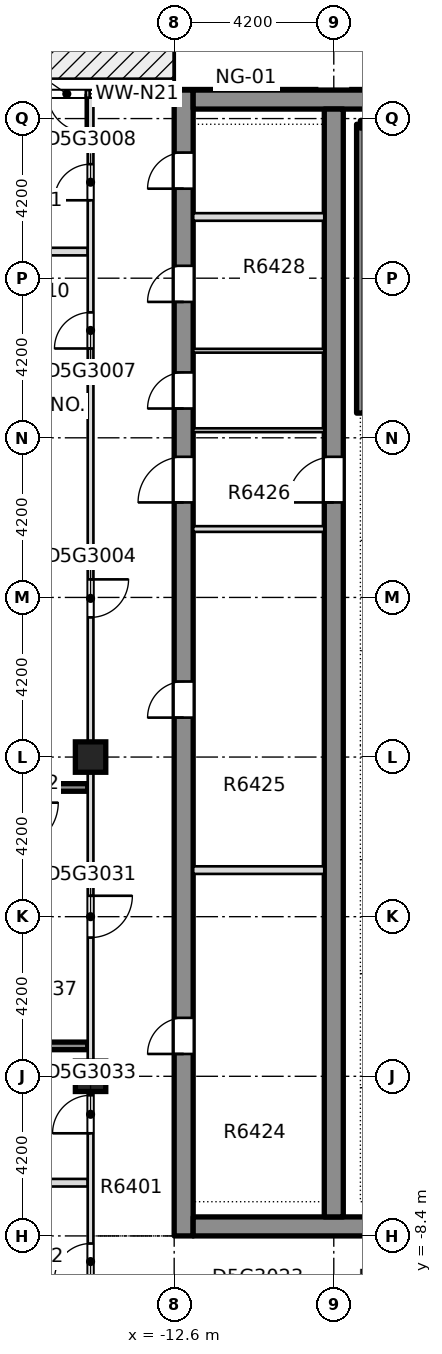
"""IFC4 building model, lengths in metres.
Left out: names, types, materials, properties, quantities, classifications, styles, units other than length and angle.
Written with IfcOpenShell. Run it as: python <this file> out.ifc"""

import sys

from ifc_helpers import new_model, si_unit, direction, frame, frame_2d, origin, origin_2d, place, context, subcontext, project, spatial, rectangle, extrude, element, fill, save


model = new_model("IFC4")
c1 = context("Model", 3, precision=1e-05, world=origin(), true_north=direction((0.0, 1.0)))
c2 = subcontext(c1, "Body", "Model", "MODEL_VIEW")
j1 = project(units=[si_unit("LENGTHUNIT", "METRE"), si_unit("PLANEANGLEUNIT", "RADIAN")], contexts=[c1])
p1 = place(None, origin())
s1 = spatial("IfcSite", under=j1, at=p1, CompositionType="ELEMENT")
p2 = place(p1, origin())
s2 = spatial("IfcBuilding", under=s1, at=p2, CompositionType="ELEMENT")
p3 = place(p2, frame((0.0, 0.0, 244.15)))
s3 = spatial("IfcBuildingStorey", under=s2, at=p3, CompositionType="ELEMENT", Elevation=244.15)
p4 = place(p3, frame((-12.35, -8.4, -0.4), z_axis=(0.0, 0.0, 1.0), x_axis=(0.0, 1.0, 0.0)))
e1 = element("IfcWall", 1, at=p4, inside=s3, PredefinedType="SHEAR", context=c2, shape_type="SweptSolid", body=[
    extrude(rectangle(XDim=30.15, YDim=0.5, at=frame_2d((15.075, 0.0))), origin(), (0.0, 0.0, 1.0), 3.45),
])
p5 = place(p4, frame((4.788, 0.0, 0.4)))
e2 = element("IfcOpeningElement", 2, at=p5, cuts=e1, PredefinedType="OPENING", context=c2, shape_type="SweptSolid", body=[
    extrude(rectangle(XDim=0.95, YDim=2.1, at=frame_2d((0.475, 1.05))), frame((0.0, 0.26, 0.0), z_axis=(0.0, -1.0, 0.0), x_axis=(1.0, 0.0, 0.0)), (0.0, 0.0, 1.0), 0.52),
])
p6 = place(p4, frame((13.638, 0.0, 0.4)))
e3 = element("IfcOpeningElement", 3, at=p6, cuts=e1, PredefinedType="OPENING", context=c2, shape_type="SweptSolid", body=[
    extrude(rectangle(XDim=0.95, YDim=2.1, at=frame_2d((0.475, 1.05))), frame((0.0, 0.26, 0.0), z_axis=(0.0, -1.0, 0.0), x_axis=(1.0, 0.0, 0.0)), (0.0, 0.0, 1.0), 0.52),
])
p7 = place(p4, frame((21.771, 0.0, 0.4)))
e4 = element("IfcOpeningElement", 4, at=p7, cuts=e1, PredefinedType="OPENING", context=c2, shape_type="SweptSolid", body=[
    extrude(rectangle(XDim=0.95, YDim=2.1, at=frame_2d((0.475, 1.05))), frame((0.0, 0.26, 0.0), z_axis=(0.0, -1.0, 0.0), x_axis=(1.0, 0.0, 0.0)), (0.0, 0.0, 1.0), 0.52),
])
p8 = place(p4, frame((24.576, 0.0, 0.4)))
e5 = element("IfcOpeningElement", 5, at=p8, cuts=e1, PredefinedType="OPENING", context=c2, shape_type="SweptSolid", body=[
    extrude(rectangle(XDim=0.95, YDim=2.1, at=frame_2d((0.475, 1.05))), frame((0.0, 0.26, 0.0), z_axis=(0.0, -1.0, 0.0), x_axis=(1.0, 0.0, 0.0)), (0.0, 0.0, 1.0), 0.52),
])
p9 = place(p4, frame((27.555, 0.0, 0.4)))
e6 = element("IfcOpeningElement", 6, at=p9, cuts=e1, PredefinedType="OPENING", context=c2, shape_type="SweptSolid", body=[
    extrude(rectangle(XDim=0.95, YDim=2.1, at=frame_2d((0.475, 1.05))), frame((0.0, 0.26, 0.0), z_axis=(0.0, -1.0, 0.0), x_axis=(1.0, 0.0, 0.0)), (0.0, 0.0, 1.0), 0.52),
])
p10 = place(p4, frame((19.3, 0.0, 0.4)))
e7 = element("IfcOpeningElement", 7, at=p10, cuts=e1, PredefinedType="OPENING", context=c2, shape_type="SweptSolid", body=[
    extrude(rectangle(XDim=1.2, YDim=2.1, at=frame_2d((0.6, 1.05))), frame((0.0, 0.26, 0.0), z_axis=(0.0, -1.0, 0.0), x_axis=(1.0, 0.0, 0.0)), (0.0, 0.0, 1.0), 0.52),
])
p11 = place(p3, frame((-12.1, -8.15, -0.4), z_axis=(0.0, 0.0, 1.0), x_axis=(1.0, 0.0, 0.0)))
e8 = element("IfcWall", 8, at=p11, inside=s3, PredefinedType="SHEAR", context=c2, shape_type="SweptSolid", body=[
    extrude(rectangle(XDim=24.2, YDim=0.5, at=frame_2d((12.1, 0.0))), origin(), (0.0, 0.0, 1.0), 3.45),
])
p12 = place(p11, frame((7.35, 0.0, 0.4)))
e9 = element("IfcOpeningElement", 9, at=p12, cuts=e8, PredefinedType="OPENING", context=c2, shape_type="SweptSolid", body=[
    extrude(rectangle(XDim=1.8, YDim=2.1, at=frame_2d((0.9, 1.05))), frame((0.0, 0.26, 0.0), z_axis=(0.0, -1.0, 0.0), x_axis=(1.0, 0.0, 0.0)), (0.0, 0.0, 1.0), 0.52),
])
p13 = place(p11, frame((15.05, 0.0, 0.4)))
e10 = element("IfcOpeningElement", 10, at=p13, cuts=e8, PredefinedType="OPENING", context=c2, shape_type="SweptSolid", body=[
    extrude(rectangle(XDim=1.8, YDim=2.1, at=frame_2d((0.9, 1.05))), frame((0.0, 0.26, 0.0), z_axis=(0.0, -1.0, 0.0), x_axis=(1.0, 0.0, 0.0)), (0.0, 0.0, 1.0), 0.52),
])
p14 = place(p3, frame((-12.1, 21.5, -0.4), z_axis=(0.0, 0.0, 1.0), x_axis=(1.0, 0.0, 0.0)))
e11 = element("IfcWall", 11, at=p14, inside=s3, PredefinedType="SHEAR", context=c2, shape_type="SweptSolid", body=[
    extrude(rectangle(XDim=24.2, YDim=0.5, at=frame_2d((12.1, 0.0))), origin(), (0.0, 0.0, 1.0), 3.45),
])
p15 = place(p3, frame((-8.4, -7.9, -0.4), z_axis=(0.0, 0.0, 1.0), x_axis=(0.0, 1.0, 0.0)))
e12 = element("IfcWall", 12, at=p15, inside=s3, PredefinedType="SHEAR", context=c2, shape_type="SweptSolid", body=[
    extrude(rectangle(XDim=29.15, YDim=0.5, at=frame_2d((14.575, 0.0))), origin(), (0.0, 0.0, 1.0), 3.45),
])
p16 = place(p15, frame((18.8, 0.0, 0.4)))
e13 = element("IfcOpeningElement", 13, at=p16, cuts=e12, PredefinedType="OPENING", context=c2, shape_type="SweptSolid", body=[
    extrude(rectangle(XDim=1.2, YDim=2.1, at=frame_2d((0.6, 1.05))), frame((0.0, 0.26, 0.0), z_axis=(0.0, -1.0, 0.0), x_axis=(1.0, 0.0, 0.0)), (0.0, 0.0, 1.0), 0.52),
])
for number, where, z_axis, x_axis in (
    (14, (-14.8, -4.2, -0.4), (0.0, 0.0, 1.0), (1.0, 0.0, 0.0)),
    (15, (-14.8, 4.2, -0.4), (0.0, 0.0, 1.0), (1.0, 0.0, 0.0)),
):
    element("IfcColumn", number, at=place(p3, frame(where, z_axis=z_axis, x_axis=x_axis)), inside=s3, PredefinedType="COLUMN", context=c2, shape_type="SweptSolid", body=[
        extrude(rectangle(XDim=0.8, YDim=0.8, at=origin_2d()), origin(), (0.0, 0.0, 1.0), 3.45),
    ])
p17 = place(p3, frame((-25.75, -7.0, 0.0), z_axis=(0.0, 0.0, 1.0), x_axis=(1.0, 0.0, 0.0)))
e16 = element("IfcWall", 16, at=p17, inside=s3, PredefinedType="PARTITIONING", context=c2, shape_type="SweptSolid", body=[
    extrude(rectangle(XDim=10.875, YDim=0.2, at=frame_2d((5.438, 0.0))), origin(), (0.0, 0.0, 1.0), 3.05),
])
p18 = place(p3, frame((-20.4, -3.4, 0.0), z_axis=(0.0, 0.0, 1.0), x_axis=(1.0, 0.0, 0.0)))
e17 = element("IfcWall", 17, at=p18, inside=s3, PredefinedType="SOLIDWALL", context=c2, shape_type="SweptSolid", body=[
    extrude(rectangle(XDim=5.525, YDim=0.2, at=frame_2d((2.762, 0.0))), origin(), (0.0, 0.0, 1.0), 3.05),
])
p19 = place(p3, frame((-20.45, 3.4, 0.0), z_axis=(0.0, 0.0, 1.0), x_axis=(1.0, 0.0, 0.0)))
e18 = element("IfcWall", 18, at=p19, inside=s3, PredefinedType="SOLIDWALL", context=c2, shape_type="SweptSolid", body=[
    extrude(rectangle(XDim=5.575, YDim=0.2, at=frame_2d((2.788, 0.0))), origin(), (0.0, 0.0, 1.0), 3.05),
])
for number, where, z_axis, x_axis in (
    (19, (-17.35, 13.35, 0.0), (0.0, 0.0, 1.0), (1.0, 0.0, 0.0)),
    (20, (-17.35, 17.5, 0.0), (0.0, 0.0, 1.0), (1.0, 0.0, 0.0)),
):
    element("IfcWall", number, at=place(p3, frame(where, z_axis=z_axis, x_axis=x_axis)), inside=s3, PredefinedType="PARTITIONING", context=c2, shape_type="SweptSolid", body=[
        extrude(rectangle(XDim=2.475, YDim=0.2, at=frame_2d((1.238, 0.0))), origin(), (0.0, 0.0, 1.0), 3.05),
    ])
p20 = place(p3, frame((-14.8, -9.85, 0.0), z_axis=(0.0, 0.0, 1.0), x_axis=(0.0, 1.0, 0.0)))
e21 = element("IfcWall", 21, at=p20, inside=s3, PredefinedType="PARTITIONING", context=c2, shape_type="SweptSolid", body=[
    extrude(rectangle(XDim=31.4, YDim=0.15, at=frame_2d((15.7, 0.0))), origin(), (0.0, 0.0, 1.0), 3.05),
])
p21 = place(p20, frame((0.3, 0.0, 0.0)))
e22 = element("IfcOpeningElement", 22, at=p21, cuts=e21, PredefinedType="OPENING", context=c2, shape_type="SweptSolid", body=[
    extrude(rectangle(XDim=0.95, YDim=2.1, at=frame_2d((0.475, 1.05))), frame((0.0, 0.085, 0.0), z_axis=(0.0, -1.0, 0.0), x_axis=(1.0, 0.0, 0.0)), (0.0, 0.0, 1.0), 0.17),
])
p22 = place(p20, frame((17.725, 0.0, 0.0)))
e23 = element("IfcOpeningElement", 23, at=p22, cuts=e21, PredefinedType="OPENING", context=c2, shape_type="SweptSolid", body=[
    extrude(rectangle(XDim=1.0, YDim=2.1, at=frame_2d((0.5, 1.05))), frame((0.0, 0.085, 0.0), z_axis=(0.0, -1.0, 0.0), x_axis=(1.0, 0.0, 0.0)), (0.0, 0.0, 1.0), 0.17),
])
p23 = place(p20, frame((24.8, 0.0, 0.0)))
e24 = element("IfcOpeningElement", 24, at=p23, cuts=e21, PredefinedType="OPENING", context=c2, shape_type="SweptSolid", body=[
    extrude(rectangle(XDim=0.95, YDim=2.1, at=frame_2d((0.475, 1.05))), frame((0.0, 0.085, 0.0), z_axis=(0.0, -1.0, 0.0), x_axis=(1.0, 0.0, 0.0)), (0.0, 0.0, 1.0), 0.17),
])
p24 = place(p20, frame((28.7, 0.0, 0.0)))
e25 = element("IfcOpeningElement", 25, at=p24, cuts=e21, PredefinedType="OPENING", context=c2, shape_type="SweptSolid", body=[
    extrude(rectangle(XDim=0.95, YDim=2.1, at=frame_2d((0.475, 1.05))), frame((0.0, 0.085, 0.0), z_axis=(0.0, -1.0, 0.0), x_axis=(1.0, 0.0, 0.0)), (0.0, 0.0, 1.0), 0.17),
])
p25 = place(p20, frame((9.3, 0.0, 0.0)))
e26 = element("IfcOpeningElement", 26, at=p25, cuts=e21, PredefinedType="OPENING", context=c2, shape_type="SweptSolid", body=[
    extrude(rectangle(XDim=1.1, YDim=2.1, at=frame_2d((0.55, 1.05))), frame((0.0, 0.085, 0.0), z_axis=(0.0, -1.0, 0.0), x_axis=(1.0, 0.0, 0.0)), (0.0, 0.0, 1.0), 0.17),
])
p26 = place(p20, frame((4.15, 0.0, 0.0)))
e27 = element("IfcOpeningElement", 27, at=p26, cuts=e21, PredefinedType="OPENING", context=c2, shape_type="SweptSolid", body=[
    extrude(rectangle(XDim=1.0, YDim=2.1, at=frame_2d((0.5, 1.05))), frame((0.0, 0.085, 0.0), z_axis=(0.0, -1.0, 0.0), x_axis=(1.0, 0.0, 0.0)), (0.0, 0.0, 1.0), 0.17),
])
p27 = place(p3, frame((-12.6, 21.65, 0.0), z_axis=(0.0, 0.0, 1.0), x_axis=(-1.0, 0.0, 0.0)))
e28 = element("IfcWall", 28, at=p27, inside=s3, PredefinedType="STANDARD", context=c2, shape_type="SweptSolid", body=[
    extrude(rectangle(XDim=3.75, YDim=0.2, at=frame_2d((1.875, 0.0))), origin(), (0.0, 0.0, 1.0), 3.05),
])
p28 = place(p27, frame((0.425, 0.0, 0.2)))
e29 = element("IfcOpeningElement", 29, at=p28, cuts=e28, PredefinedType="OPENING", context=c2, shape_type="SweptSolid", body=[
    extrude(rectangle(XDim=1.8, YDim=2.65, at=frame_2d((0.9, 1.325))), frame((0.0, 0.11, 0.0), z_axis=(0.0, -1.0, 0.0), x_axis=(1.0, 0.0, 0.0)), (0.0, 0.0, 1.0), 0.22),
])
p29 = place(p27, frame((2.325, 0.0, 0.0)))
e30 = element("IfcOpeningElement", 30, at=p29, cuts=e28, PredefinedType="OPENING", context=c2, shape_type="SweptSolid", body=[
    extrude(rectangle(XDim=1.0, YDim=2.4, at=frame_2d((0.5, 1.2))), frame((0.0, 0.11, 0.0), z_axis=(0.0, -1.0, 0.0), x_axis=(1.0, 0.0, 0.0)), (0.0, 0.0, 1.0), 0.22),
])
p30 = place(p3, frame((-12.099, 1.225, 0.0), z_axis=(0.0, 0.0, 1.0), x_axis=(1.0, 0.0, 0.0)))
e31 = element("IfcWall", 31, at=p30, inside=s3, PredefinedType="PARTITIONING", context=c2, shape_type="SweptSolid", body=[
    extrude(rectangle(XDim=3.448, YDim=0.2, at=frame_2d((1.724, 0.0))), origin(), (0.0, 0.0, 1.0), 3.05),
])
p31 = place(p3, frame((-12.099, 10.2, 0.0), z_axis=(0.0, 0.0, 1.0), x_axis=(1.0, 0.0, 0.0)))
e32 = element("IfcWall", 32, at=p31, inside=s3, PredefinedType="PARTITIONING", context=c2, shape_type="SweptSolid", body=[
    extrude(rectangle(XDim=3.448, YDim=0.15, at=frame_2d((1.724, 0.0))), origin(), (0.0, 0.0, 1.0), 3.05),
])
for number, where, z_axis, x_axis in (
    (33, (-12.099, 12.8, 0.0), (0.0, 0.0, 1.0), (1.0, 0.0, 0.0)),
    (34, (-12.099, 14.891, 0.0), (0.0, 0.0, 1.0), (1.0, 0.0, 0.0)),
):
    element("IfcWall", number, at=place(p3, frame(where, z_axis=z_axis, x_axis=x_axis)), inside=s3, PredefinedType="PARTITIONING", context=c2, shape_type="SweptSolid", body=[
        extrude(rectangle(XDim=3.448, YDim=0.1, at=frame_2d((1.724, 0.0))), origin(), (0.0, 0.0, 1.0), 3.05),
    ])
p32 = place(p3, frame((-12.099, 18.411, 0.0), z_axis=(0.0, 0.0, 1.0), x_axis=(1.0, 0.0, 0.0)))
e35 = element("IfcWall", 35, at=p32, inside=s3, PredefinedType="PARTITIONING", context=c2, shape_type="SweptSolid", body=[
    extrude(rectangle(XDim=3.448, YDim=0.2, at=frame_2d((1.724, 0.0))), origin(), (0.0, 0.0, 1.0), 3.05),
])
p33 = place(p3, frame((-7.7, 13.25, 0.0), z_axis=(0.0, 0.0, 1.0), x_axis=(0.0, 1.0, 0.0)))
e36 = element("IfcWall", 36, at=p33, inside=s3, PredefinedType="SOLIDWALL", context=c2, shape_type="SweptSolid", body=[
    extrude(rectangle(XDim=7.6, YDim=0.2, at=frame_2d((3.8, 0.0))), origin(), (0.0, 0.0, 1.0), 3.05),
])
p34 = place(p3, frame((-7.7, 20.85, 0.0), z_axis=(0.0, 0.0, 1.0), x_axis=(1.0, 0.0, 0.0)))
e37 = element("IfcWall", 37, at=p34, inside=s3, PredefinedType="SOLIDWALL", context=c2, shape_type="SweptSolid", body=[
    extrude(rectangle(XDim=3.55, YDim=0.2, at=frame_2d((1.775, 0.0))), origin(), (0.0, 0.0, 1.0), 3.05),
])
p35 = place(p21, origin())
e38 = element("IfcDoor", 38, at=p35, inside=s3, OperationType="SINGLE_SWING_LEFT", PredefinedType="DOOR", context=c2, shape_type="SweptSolid", body=[
    extrude(rectangle(XDim=0.95, YDim=2.1, at=frame_2d((0.475, 1.05))), frame((0.0, 0.025, 0.0), z_axis=(0.0, -1.0, 0.0), x_axis=(1.0, 0.0, 0.0)), (0.0, 0.0, 1.0), 0.05),
])
fill(e22, e38)
p36 = place(p22, origin())
e39 = element("IfcDoor", 39, at=p36, inside=s3, OperationType="SINGLE_SWING_RIGHT", PredefinedType="DOOR", context=c2, shape_type="SweptSolid", body=[
    extrude(rectangle(XDim=1.0, YDim=2.1, at=frame_2d((0.5, 1.05))), frame((0.0, 0.025, 0.0), z_axis=(0.0, -1.0, 0.0), x_axis=(1.0, 0.0, 0.0)), (0.0, 0.0, 1.0), 0.05),
])
fill(e23, e39)
p37 = place(p23, origin())
e40 = element("IfcDoor", 40, at=p37, inside=s3, OperationType="SINGLE_SWING_LEFT", PredefinedType="DOOR", context=c2, shape_type="SweptSolid", body=[
    extrude(rectangle(XDim=0.95, YDim=2.1, at=frame_2d((0.475, 1.05))), frame((0.0, 0.025, 0.0), z_axis=(0.0, -1.0, 0.0), x_axis=(1.0, 0.0, 0.0)), (0.0, 0.0, 1.0), 0.05),
])
fill(e24, e40)
p38 = place(p24, origin())
e41 = element("IfcDoor", 41, at=p38, inside=s3, OperationType="SINGLE_SWING_LEFT", PredefinedType="DOOR", context=c2, shape_type="SweptSolid", body=[
    extrude(rectangle(XDim=0.95, YDim=2.1, at=frame_2d((0.475, 1.05))), frame((0.0, 0.025, 0.0), z_axis=(0.0, -1.0, 0.0), x_axis=(1.0, 0.0, 0.0)), (0.0, 0.0, 1.0), 0.05),
])
fill(e25, e41)
p39 = place(p25, origin())
e42 = element("IfcDoor", 42, at=p39, inside=s3, OperationType="SINGLE_SWING_RIGHT", PredefinedType="DOOR", context=c2, shape_type="SweptSolid", body=[
    extrude(rectangle(XDim=1.1, YDim=2.1, at=frame_2d((0.55, 1.05))), frame((0.0, 0.025, 0.0), z_axis=(0.0, -1.0, 0.0), x_axis=(1.0, 0.0, 0.0)), (0.0, 0.0, 1.0), 0.05),
])
fill(e26, e42)
p40 = place(p26, origin())
e43 = element("IfcDoor", 43, at=p40, inside=s3, OperationType="SINGLE_SWING_LEFT", PredefinedType="DOOR", context=c2, shape_type="SweptSolid", body=[
    extrude(rectangle(XDim=1.0, YDim=2.1, at=frame_2d((0.5, 1.05))), frame((0.0, 0.025, 0.0), z_axis=(0.0, -1.0, 0.0), x_axis=(1.0, 0.0, 0.0)), (0.0, 0.0, 1.0), 0.05),
])
fill(e27, e43)
p41 = place(p28, origin())
e44 = element("IfcWindow", 44, at=p41, inside=s3, PartitioningType="SINGLE_PANEL", PredefinedType="WINDOW", context=c2, shape_type="SweptSolid", body=[
    extrude(rectangle(XDim=1.8, YDim=2.65, at=frame_2d((0.9, 1.325))), frame((0.0, 0.03, 0.0), z_axis=(0.0, -1.0, 0.0), x_axis=(1.0, 0.0, 0.0)), (0.0, 0.0, 1.0), 0.06),
])
fill(e29, e44)
p42 = place(p29, origin())
e45 = element("IfcDoor", 45, at=p42, inside=s3, OperationType="SINGLE_SWING_LEFT", PredefinedType="DOOR", context=c2, shape_type="SweptSolid", body=[
    extrude(rectangle(XDim=1.0, YDim=2.4, at=frame_2d((0.5, 1.2))), frame((0.0, 0.025, 0.0), z_axis=(0.0, -1.0, 0.0), x_axis=(1.0, 0.0, 0.0)), (0.0, 0.0, 1.0), 0.05),
])
fill(e30, e45)
p43 = place(p5, origin())
e46 = element("IfcDoor", 46, at=p43, inside=s3, OperationType="SINGLE_SWING_LEFT", PredefinedType="DOOR", context=c2, shape_type="SweptSolid", body=[
    extrude(rectangle(XDim=0.95, YDim=2.1, at=frame_2d((0.475, 1.05))), frame((0.0, 0.025, 0.0), z_axis=(0.0, -1.0, 0.0), x_axis=(1.0, 0.0, 0.0)), (0.0, 0.0, 1.0), 0.05),
])
fill(e2, e46)
p44 = place(p6, origin())
e47 = element("IfcDoor", 47, at=p44, inside=s3, OperationType="SINGLE_SWING_LEFT", PredefinedType="DOOR", context=c2, shape_type="SweptSolid", body=[
    extrude(rectangle(XDim=0.95, YDim=2.1, at=frame_2d((0.475, 1.05))), frame((0.0, 0.025, 0.0), z_axis=(0.0, -1.0, 0.0), x_axis=(1.0, 0.0, 0.0)), (0.0, 0.0, 1.0), 0.05),
])
fill(e3, e47)
p45 = place(p7, origin())
e48 = element("IfcDoor", 48, at=p45, inside=s3, OperationType="SINGLE_SWING_LEFT", PredefinedType="DOOR", context=c2, shape_type="SweptSolid", body=[
    extrude(rectangle(XDim=0.95, YDim=2.1, at=frame_2d((0.475, 1.05))), frame((0.0, 0.025, 0.0), z_axis=(0.0, -1.0, 0.0), x_axis=(1.0, 0.0, 0.0)), (0.0, 0.0, 1.0), 0.05),
])
fill(e4, e48)
p46 = place(p8, origin())
e49 = element("IfcDoor", 49, at=p46, inside=s3, OperationType="SINGLE_SWING_LEFT", PredefinedType="DOOR", context=c2, shape_type="SweptSolid", body=[
    extrude(rectangle(XDim=0.95, YDim=2.1, at=frame_2d((0.475, 1.05))), frame((0.0, 0.025, 0.0), z_axis=(0.0, -1.0, 0.0), x_axis=(1.0, 0.0, 0.0)), (0.0, 0.0, 1.0), 0.05),
])
fill(e5, e49)
p47 = place(p9, origin())
e50 = element("IfcDoor", 50, at=p47, inside=s3, OperationType="SINGLE_SWING_LEFT", PredefinedType="DOOR", context=c2, shape_type="SweptSolid", body=[
    extrude(rectangle(XDim=0.95, YDim=2.1, at=frame_2d((0.475, 1.05))), frame((0.0, 0.025, 0.0), z_axis=(0.0, -1.0, 0.0), x_axis=(1.0, 0.0, 0.0)), (0.0, 0.0, 1.0), 0.05),
])
fill(e6, e50)
p48 = place(p10, origin())
e51 = element("IfcDoor", 51, at=p48, inside=s3, OperationType="SINGLE_SWING_LEFT", PredefinedType="DOOR", context=c2, shape_type="SweptSolid", body=[
    extrude(rectangle(XDim=1.2, YDim=2.1, at=frame_2d((0.6, 1.05))), frame((0.0, 0.025, 0.0), z_axis=(0.0, -1.0, 0.0), x_axis=(1.0, 0.0, 0.0)), (0.0, 0.0, 1.0), 0.05),
])
fill(e7, e51)
p49 = place(p16, origin())
e52 = element("IfcDoor", 52, at=p49, inside=s3, OperationType="SINGLE_SWING_LEFT", PredefinedType="DOOR", context=c2, shape_type="SweptSolid", body=[
    extrude(rectangle(XDim=1.2, YDim=2.1, at=frame_2d((0.6, 1.05))), frame((0.0, 0.025, 0.0), z_axis=(0.0, -1.0, 0.0), x_axis=(1.0, 0.0, 0.0)), (0.0, 0.0, 1.0), 0.05),
])
fill(e13, e52)
save(model, sys.argv[1])
